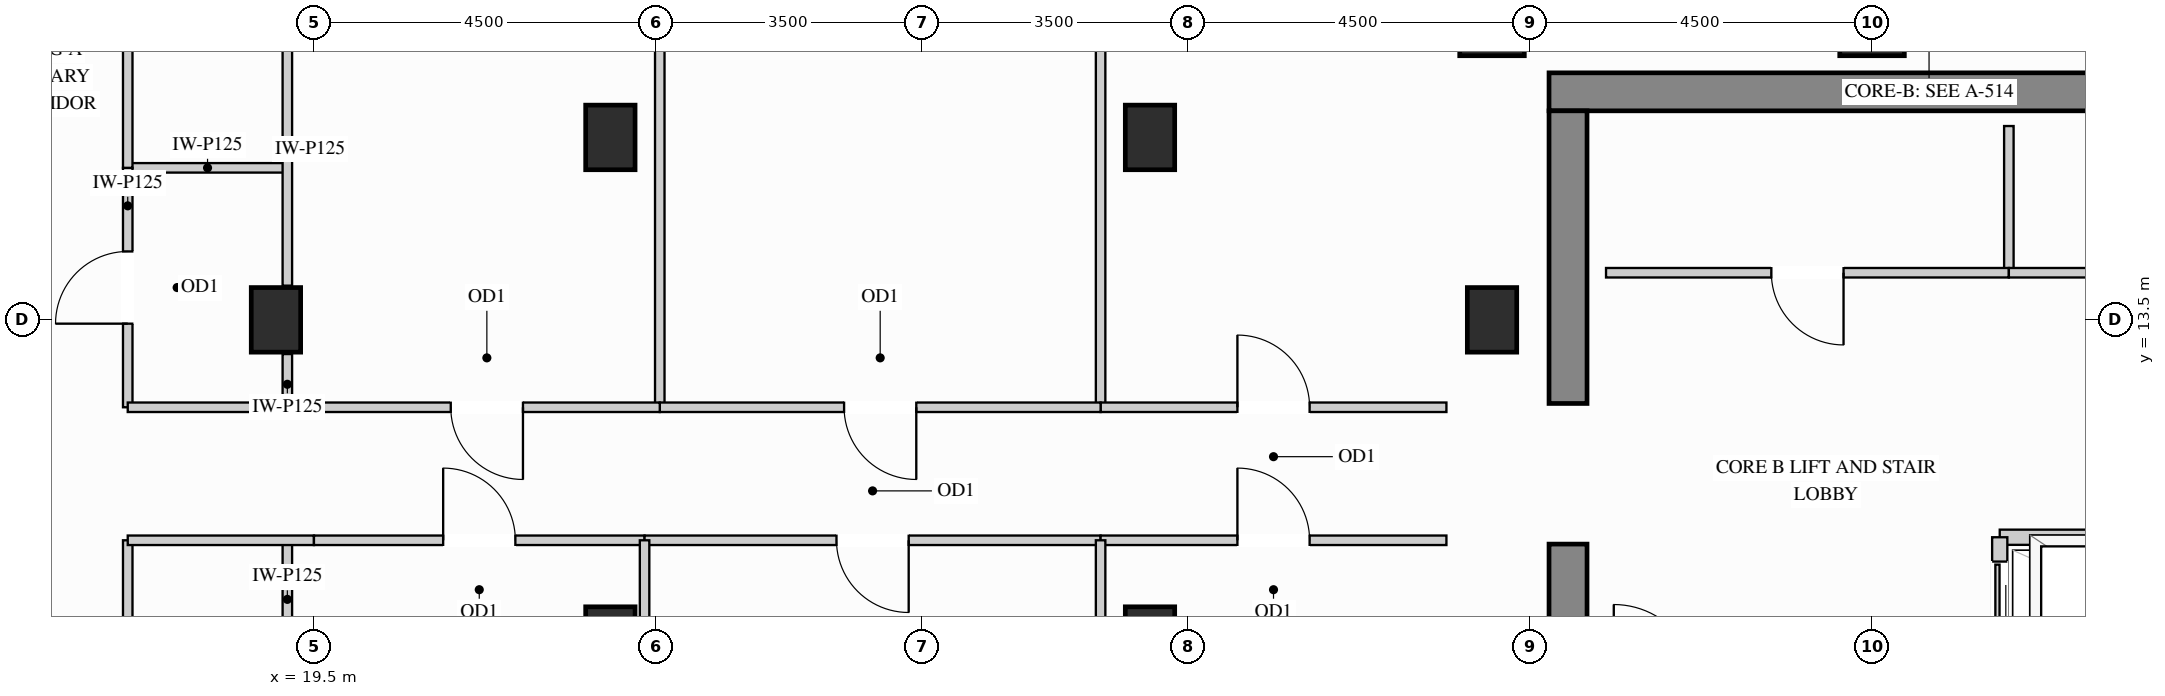
"""IFC4 building model, lengths in metres.
Left out: names, types, materials, properties, quantities, classifications, styles, units other than length and angle.
Written with IfcOpenShell. Run it as: python <this file> out.ifc"""

import sys

from ifc_helpers import new_model, si_unit, direction, frame, frame_2d, origin, origin_2d, place, context, subcontext, project, spatial, rectangle, extrude, source, transform, mapped, element, fill, save


model = new_model("IFC4")
c1 = context("Model", 3, precision=1e-05, world=origin(), true_north=direction((0.0, 1.0)))
c2 = subcontext(c1, "Body", "Model", "MODEL_VIEW")
j1 = project(units=[si_unit("LENGTHUNIT", "METRE"), si_unit("PLANEANGLEUNIT", "RADIAN")], contexts=[c1])
p1 = place(None, origin())
s1 = spatial("IfcSite", under=j1, at=p1, CompositionType="ELEMENT")
p2 = place(p1, origin())
s2 = spatial("IfcBuilding", under=s1, at=p2, CompositionType="ELEMENT")
p3 = place(p2, frame((0.0, 0.0, 252.0)))
s3 = spatial("IfcBuildingStorey", under=s2, at=p3, CompositionType="ELEMENT", Elevation=252.0)
m1 = source(origin(), c2, "Body", "SweptSolid", [
    extrude(rectangle(XDim=0.65, YDim=0.85, at=origin_2d()), origin(), (0.0, 0.0, 1.0), 3.4),
])
for number, where, z_axis, x_axis in (
    (1, (19.0, 13.5, 0.0), (0.0, 0.0, 1.0), (1.0, 0.0, 0.0)),
    (2, (35.0, 13.5, 0.0), (0.0, 0.0, 1.0), (1.0, 0.0, 0.0)),
    (3, (23.4, 15.9, 0.0), (0.0, 0.0, 1.0), (1.0, 0.0, 0.0)),
    (4, (23.4, 9.3, 0.0), (0.0, 0.0, 1.0), (1.0, 0.0, 0.0)),
    (5, (30.5, 15.9, 0.0), (0.0, 0.0, 1.0), (1.0, 0.0, 0.0)),
    (6, (30.5, 9.3, 0.0), (0.0, 0.0, 1.0), (1.0, 0.0, 0.0)),
):
    element("IfcColumn", number, at=place(p3, frame(where, z_axis=z_axis, x_axis=x_axis)), inside=s3, PredefinedType="COLUMN", context=c2, shape_type="MappedRepresentation", body=[
        mapped(m1, transform((0.0, 0.0, 0.0), x_axis=(1.0, 0.0, 0.0), y_axis=(0.0, 1.0, 0.0), z_axis=(0.0, 0.0, 1.0))),
    ])
m2 = source(origin(), c2, "Body", "SweptSolid", [
    extrude(rectangle(XDim=0.85, YDim=0.85, at=origin_2d()), origin(), (0.0, 0.0, 1.0), 3.4),
])
for number, where, z_axis, x_axis in (
    (7, (35.0, 17.4, 0.0), (0.0, 0.0, 1.0), (1.0, 0.0, 0.0)),
    (8, (40.0, 17.4, 0.0), (0.0, 0.0, 1.0), (1.0, 0.0, 0.0)),
):
    element("IfcColumn", number, at=place(p3, frame(where, z_axis=z_axis, x_axis=x_axis)), inside=s3, PredefinedType="COLUMN", context=c2, shape_type="MappedRepresentation", body=[
        mapped(m2, transform((0.0, 0.0, 0.0), x_axis=(1.0, 0.0, 0.0), y_axis=(0.0, 1.0, 0.0), z_axis=(0.0, 0.0, 1.0))),
    ])
m3 = source(origin(), c2, "Body", "SweptSolid", [
    extrude(rectangle(XDim=10.0, YDim=0.5, at=frame_2d((5.0, 0.0))), origin(), (0.0, 0.0, 1.0), 3.4),
])
p4 = place(p3, frame((35.75, 16.5, 0.0), z_axis=(0.0, 0.0, 1.0), x_axis=(1.0, 0.0, 0.0)))
e9 = element("IfcWall", 9, at=p4, inside=s3, PredefinedType="SHEAR", context=c2, shape_type="MappedRepresentation", body=[
    mapped(m3, transform((0.0, 0.0, 0.0), x_axis=(1.0, 0.0, 0.0), y_axis=(0.0, 1.0, 0.0), z_axis=(0.0, 0.0, 1.0))),
])
m4 = source(origin(), c2, "Body", "SweptSolid", [
    extrude(rectangle(XDim=5.8, YDim=0.5, at=frame_2d((2.9, 0.0))), origin(), (0.0, 0.0, 1.0), 3.4),
])
p5 = place(p3, frame((36.0, 4.75, 0.0), z_axis=(0.0, 0.0, 1.0), x_axis=(0.0, 1.0, 0.0)))
e10 = element("IfcWall", 10, at=p5, inside=s3, PredefinedType="SHEAR", context=c2, shape_type="MappedRepresentation", body=[
    mapped(m4, transform((0.0, 0.0, 0.0), x_axis=(1.0, 0.0, 0.0), y_axis=(0.0, 1.0, 0.0), z_axis=(0.0, 0.0, 1.0))),
])
m5 = source(origin(), c2, "Body", "SweptSolid", [
    extrude(rectangle(XDim=3.85, YDim=0.5, at=frame_2d((1.925, 0.0))), origin(), (0.0, 0.0, 1.0), 3.4),
])
p6 = place(p3, frame((36.0, 12.4, 0.0), z_axis=(0.0, 0.0, 1.0), x_axis=(0.0, 1.0, 0.0)))
e11 = element("IfcWall", 11, at=p6, inside=s3, PredefinedType="SHEAR", context=c2, shape_type="MappedRepresentation", body=[
    mapped(m5, transform((0.0, 0.0, 0.0), x_axis=(1.0, 0.0, 0.0), y_axis=(0.0, 1.0, 0.0), z_axis=(0.0, 0.0, 1.0))),
])
m6 = source(origin(), c2, "Body", "SweptSolid", [
    extrude(rectangle(XDim=1.93, YDim=0.125, at=frame_2d((0.965, 0.0))), origin(), (0.0, 0.0, 1.0), 3.385),
])
p7 = place(p3, frame((41.8, 14.12, 0.0), z_axis=(0.0, 0.0, 1.0), x_axis=(0.0, 1.0, 0.0)))
e12 = element("IfcWall", 12, at=p7, inside=s3, PredefinedType="PARTITIONING", context=c2, shape_type="MappedRepresentation", body=[
    mapped(m6, transform((0.0, 0.0, 0.0), x_axis=(1.0, 0.0, 0.0), y_axis=(0.0, 1.0, 0.0), z_axis=(0.0, 0.0, 1.0))),
])
p8 = place(p3, frame((36.5, 14.12, 0.0), z_axis=(0.0, 0.0, 1.0), x_axis=(1.0, 0.0, 0.0)))
e13 = element("IfcWall", 13, at=p8, inside=s3, PredefinedType="PARTITIONING", context=c2, shape_type="SweptSolid", body=[
    extrude(rectangle(XDim=5.3, YDim=0.125, at=frame_2d((2.65, 0.0))), origin(), (0.0, 0.0, 1.0), 3.385),
])
p9 = place(p8, frame((2.175, 0.0, 0.0)))
e14 = element("IfcOpeningElement", 14, at=p9, cuts=e13, PredefinedType="OPENING", context=c2, shape_type="SweptSolid", body=[
    extrude(rectangle(XDim=0.95, YDim=2.15, at=frame_2d((0.475, 1.075))), frame((0.0, 0.073, 0.0), z_axis=(0.0, -1.0, 0.0), x_axis=(1.0, 0.0, 0.0)), (0.0, 0.0, 1.0), 0.145),
])
p10 = place(p3, frame((41.8, 14.12, 0.0), z_axis=(0.0, 0.0, 1.0), x_axis=(1.0, 0.0, 0.0)))
e15 = element("IfcWall", 15, at=p10, inside=s3, PredefinedType="PARTITIONING", context=c2, shape_type="SweptSolid", body=[
    extrude(rectangle(XDim=3.22, YDim=0.125, at=frame_2d((1.61, 0.0))), origin(), (0.0, 0.0, 1.0), 3.385),
])
p11 = place(p10, frame((1.135, 0.0, 0.0)))
e16 = element("IfcOpeningElement", 16, at=p11, cuts=e15, PredefinedType="OPENING", context=c2, shape_type="SweptSolid", body=[
    extrude(rectangle(XDim=0.85, YDim=2.1, at=frame_2d((0.425, 1.05))), frame((0.0, 0.073, 0.0), z_axis=(0.0, -1.0, 0.0), x_axis=(1.0, 0.0, 0.0)), (0.0, 0.0, 1.0), 0.145),
])
m7 = source(origin(), c2, "Body", "SweptSolid", [
    extrude(rectangle(XDim=2.1, YDim=0.125, at=frame_2d((1.05, 0.0))), origin(), (0.0, 0.0, 1.0), 3.385),
])
p12 = place(p3, frame((17.05, 15.5, 0.0), z_axis=(0.0, 0.0, 1.0), x_axis=(1.0, 0.0, 0.0)))
e17 = element("IfcWall", 17, at=p12, inside=s3, PredefinedType="PARTITIONING", context=c2, shape_type="MappedRepresentation", body=[
    mapped(m7, transform((0.0, 0.0, 0.0), x_axis=(1.0, 0.0, 0.0), y_axis=(0.0, 1.0, 0.0), z_axis=(0.0, 0.0, 1.0))),
])
m8 = source(origin(), c2, "Body", "SweptSolid", [
    extrude(rectangle(XDim=0.7, YDim=0.125, at=frame_2d((0.35, 0.0))), origin(), (0.0, 0.0, 1.0), 2.773),
])
p13 = place(p3, frame((19.15, 12.35, 0.0), z_axis=(0.0, 0.0, 1.0), x_axis=(0.0, 1.0, 0.0)))
e18 = element("IfcWall", 18, at=p13, inside=s3, PredefinedType="PARTITIONING", context=c2, shape_type="MappedRepresentation", body=[
    mapped(m8, transform((0.0, 0.0, 0.0), x_axis=(1.0, 0.0, 0.0), y_axis=(0.0, 1.0, 0.0), z_axis=(0.0, 0.0, 1.0))),
])
m9 = source(origin(), c2, "Body", "SweptSolid", [
    extrude(rectangle(XDim=3.6, YDim=0.125, at=frame_2d((1.8, 0.0))), origin(), (0.0, 0.0, 1.0), 2.773),
])
p14 = place(p3, frame((19.15, 13.95, 0.0), z_axis=(0.0, 0.0, 1.0), x_axis=(0.0, 1.0, 0.0)))
e19 = element("IfcWall", 19, at=p14, inside=s3, PredefinedType="PARTITIONING", context=c2, shape_type="MappedRepresentation", body=[
    mapped(m9, transform((0.0, 0.0, 0.0), x_axis=(1.0, 0.0, 0.0), y_axis=(0.0, 1.0, 0.0), z_axis=(0.0, 0.0, 1.0))),
])
m10 = source(origin(), c2, "Body", "SweptSolid", [
    extrude(rectangle(XDim=1.65, YDim=0.125, at=frame_2d((0.825, 0.0))), origin(), (0.0, 0.0, 1.0), 2.773),
])
p15 = place(p3, frame((19.15, 8.95, 0.0), z_axis=(0.0, 0.0, 1.0), x_axis=(0.0, 1.0, 0.0)))
e20 = element("IfcWall", 20, at=p15, inside=s3, PredefinedType="PARTITIONING", context=c2, shape_type="MappedRepresentation", body=[
    mapped(m10, transform((0.0, 0.0, 0.0), x_axis=(1.0, 0.0, 0.0), y_axis=(0.0, 1.0, 0.0), z_axis=(0.0, 0.0, 1.0))),
])
p16 = place(p3, frame((17.05, 12.35, 0.0), z_axis=(0.0, 0.0, 1.0), x_axis=(0.0, 1.0, 0.0)))
e21 = element("IfcWall", 21, at=p16, inside=s3, PredefinedType="PARTITIONING", context=c2, shape_type="SweptSolid", body=[
    extrude(rectangle(XDim=3.15, YDim=0.125, at=frame_2d((1.575, 0.0))), origin(), (0.0, 0.0, 1.0), 3.385),
])
p17 = place(p16, frame((1.1, 0.0, 0.0)))
e22 = element("IfcOpeningElement", 22, at=p17, cuts=e21, PredefinedType="OPENING", context=c2, shape_type="SweptSolid", body=[
    extrude(rectangle(XDim=0.95, YDim=2.15, at=frame_2d((0.475, 1.075))), frame((0.0, 0.073, 0.0), z_axis=(0.0, -1.0, 0.0), x_axis=(1.0, 0.0, 0.0)), (0.0, 0.0, 1.0), 0.145),
])
p18 = place(p3, frame((17.05, 15.5, 0.0), z_axis=(0.0, 0.0, 1.0), x_axis=(0.0, 1.0, 0.0)))
e23 = element("IfcWall", 23, at=p18, inside=s3, PredefinedType="PARTITIONING", context=c2, shape_type="SweptSolid", body=[
    extrude(rectangle(XDim=7.85, YDim=0.125, at=frame_2d((3.925, 0.0))), origin(), (0.0, 0.0, 1.0), 3.385),
])
p19 = place(p18, frame((3.45, 0.0, 0.0)))
e24 = element("IfcOpeningElement", 24, at=p19, cuts=e23, PredefinedType="OPENING", context=c2, shape_type="SweptSolid", body=[
    extrude(rectangle(XDim=0.95, YDim=2.15, at=frame_2d((0.475, 1.075))), frame((0.0, 0.073, 0.0), z_axis=(0.0, -1.0, 0.0), x_axis=(1.0, 0.0, 0.0)), (0.0, 0.0, 1.0), 0.145),
])
p20 = place(p3, frame((17.05, 4.65, 0.0), z_axis=(0.0, 0.0, 1.0), x_axis=(0.0, 1.0, 0.0)))
e25 = element("IfcWall", 25, at=p20, inside=s3, PredefinedType="PARTITIONING", context=c2, shape_type="SweptSolid", body=[
    extrude(rectangle(XDim=5.95, YDim=0.125, at=frame_2d((2.975, 0.0))), origin(), (0.0, 0.0, 1.0), 3.385),
])
p21 = place(p20, frame((2.5, 0.0, 0.0)))
e26 = element("IfcOpeningElement", 26, at=p21, cuts=e25, PredefinedType="OPENING", context=c2, shape_type="SweptSolid", body=[
    extrude(rectangle(XDim=0.95, YDim=2.15, at=frame_2d((0.475, 1.075))), frame((0.0, 0.073, 0.0), z_axis=(0.0, -1.0, 0.0), x_axis=(1.0, 0.0, 0.0)), (0.0, 0.0, 1.0), 0.145),
])
m11 = source(origin(), c2, "Body", "SweptSolid", [
    extrude(rectangle(XDim=9.798, YDim=0.125, at=frame_2d((4.899, 0.0))), origin(), (0.0, 0.0, 1.0), 3.385),
])
for number, where, z_axis, x_axis in (
    (27, (24.05, 12.35, 0.0), (0.0, 0.0, 1.0), (0.0, 1.0, 0.0)),
    (28, (29.85, 12.35, 0.0), (0.0, 0.0, 1.0), (0.0, 1.0, 0.0)),
):
    element("IfcWall", number, at=place(p3, frame(where, z_axis=z_axis, x_axis=x_axis)), inside=s3, PredefinedType="PARTITIONING", context=c2, shape_type="MappedRepresentation", body=[
        mapped(m11, transform((0.0, 0.0, 0.0), x_axis=(1.0, 0.0, 0.0), y_axis=(0.0, 1.0, 0.0), z_axis=(0.0, 0.0, 1.0))),
    ])
p22 = place(p3, frame((29.85, 12.35, 0.0), z_axis=(0.0, 0.0, 1.0), x_axis=(1.0, 0.0, 0.0)))
e29 = element("IfcWall", 29, at=p22, inside=s3, PredefinedType="PARTITIONING", context=c2, shape_type="SweptSolid", body=[
    extrude(rectangle(XDim=4.55, YDim=0.125, at=frame_2d((2.275, 0.0))), origin(), (0.0, 0.0, 1.0), 3.385),
])
p23 = place(p22, frame((1.8, 0.0, 0.0)))
e30 = element("IfcOpeningElement", 30, at=p23, cuts=e29, PredefinedType="OPENING", context=c2, shape_type="SweptSolid", body=[
    extrude(rectangle(XDim=0.95, YDim=2.15, at=frame_2d((0.475, 1.075))), frame((0.0, 0.073, 0.0), z_axis=(0.0, -1.0, 0.0), x_axis=(1.0, 0.0, 0.0)), (0.0, 0.0, 1.0), 0.145),
])
p24 = place(p3, frame((24.05, 12.35, 0.0), z_axis=(0.0, 0.0, 1.0), x_axis=(1.0, 0.0, 0.0)))
e31 = element("IfcWall", 31, at=p24, inside=s3, PredefinedType="PARTITIONING", context=c2, shape_type="SweptSolid", body=[
    extrude(rectangle(XDim=5.8, YDim=0.125, at=frame_2d((2.9, 0.0))), origin(), (0.0, 0.0, 1.0), 3.385),
])
p25 = place(p24, frame((2.425, 0.0, 0.0)))
e32 = element("IfcOpeningElement", 32, at=p25, cuts=e31, PredefinedType="OPENING", context=c2, shape_type="SweptSolid", body=[
    extrude(rectangle(XDim=0.95, YDim=2.15, at=frame_2d((0.475, 1.075))), frame((0.0, 0.073, 0.0), z_axis=(0.0, -1.0, 0.0), x_axis=(1.0, 0.0, 0.0)), (0.0, 0.0, 1.0), 0.145),
])
m12 = source(origin(), c2, "Body", "SweptSolid", [
    extrude(rectangle(XDim=2.45, YDim=0.125, at=frame_2d((1.225, 0.0))), origin(), (0.0, 0.0, 1.0), 3.385),
])
p26 = place(p3, frame((17.05, 12.35, 0.0), z_axis=(0.0, 0.0, 1.0), x_axis=(1.0, 0.0, 0.0)))
e33 = element("IfcWall", 33, at=p26, inside=s3, PredefinedType="PARTITIONING", context=c2, shape_type="MappedRepresentation", body=[
    mapped(m12, transform((0.0, 0.0, 0.0), x_axis=(1.0, 0.0, 0.0), y_axis=(0.0, 1.0, 0.0), z_axis=(0.0, 0.0, 1.0))),
])
p27 = place(p3, frame((19.5, 12.35, 0.0), z_axis=(0.0, 0.0, 1.0), x_axis=(1.0, 0.0, 0.0)))
e34 = element("IfcWall", 34, at=p27, inside=s3, PredefinedType="PARTITIONING", context=c2, shape_type="SweptSolid", body=[
    extrude(rectangle(XDim=4.55, YDim=0.125, at=frame_2d((2.275, 0.0))), origin(), (0.0, 0.0, 1.0), 3.385),
])
p28 = place(p27, frame((1.8, 0.0, 0.0)))
e35 = element("IfcOpeningElement", 35, at=p28, cuts=e34, PredefinedType="OPENING", context=c2, shape_type="SweptSolid", body=[
    extrude(rectangle(XDim=0.95, YDim=2.15, at=frame_2d((0.475, 1.075))), frame((0.0, 0.073, 0.0), z_axis=(0.0, -1.0, 0.0), x_axis=(1.0, 0.0, 0.0)), (0.0, 0.0, 1.0), 0.145),
])
p29 = place(p3, frame((17.05, 10.6, 0.0), z_axis=(0.0, 0.0, 1.0), x_axis=(1.0, 0.0, 0.0)))
e36 = element("IfcWall", 36, at=p29, inside=s3, PredefinedType="PARTITIONING", context=c2, shape_type="MappedRepresentation", body=[
    mapped(m12, transform((0.0, 0.0, 0.0), x_axis=(1.0, 0.0, 0.0), y_axis=(0.0, 1.0, 0.0), z_axis=(0.0, 0.0, 1.0))),
])
p30 = place(p3, frame((19.5, 10.6, 0.0), z_axis=(0.0, 0.0, 1.0), x_axis=(1.0, 0.0, 0.0)))
e37 = element("IfcWall", 37, at=p30, inside=s3, PredefinedType="PARTITIONING", context=c2, shape_type="SweptSolid", body=[
    extrude(rectangle(XDim=4.35, YDim=0.125, at=frame_2d((2.175, 0.0))), origin(), (0.0, 0.0, 1.0), 3.385),
])
p31 = place(p30, frame((1.7, 0.0, 0.0)))
e38 = element("IfcOpeningElement", 38, at=p31, cuts=e37, PredefinedType="OPENING", context=c2, shape_type="SweptSolid", body=[
    extrude(rectangle(XDim=0.95, YDim=2.15, at=frame_2d((0.475, 1.075))), frame((0.0, 0.073, 0.0), z_axis=(0.0, -1.0, 0.0), x_axis=(1.0, 0.0, 0.0)), (0.0, 0.0, 1.0), 0.145),
])
p32 = place(p3, frame((23.85, 10.6, 0.0), z_axis=(0.0, 0.0, 1.0), x_axis=(1.0, 0.0, 0.0)))
e39 = element("IfcWall", 39, at=p32, inside=s3, PredefinedType="PARTITIONING", context=c2, shape_type="SweptSolid", body=[
    extrude(rectangle(XDim=6.0, YDim=0.125, at=frame_2d((3.0, 0.0))), origin(), (0.0, 0.0, 1.0), 3.385),
])
p33 = place(p32, frame((2.525, 0.0, 0.0)))
e40 = element("IfcOpeningElement", 40, at=p33, cuts=e39, PredefinedType="OPENING", context=c2, shape_type="SweptSolid", body=[
    extrude(rectangle(XDim=0.95, YDim=2.15, at=frame_2d((0.475, 1.075))), frame((0.0, 0.073, 0.0), z_axis=(0.0, -1.0, 0.0), x_axis=(1.0, 0.0, 0.0)), (0.0, 0.0, 1.0), 0.145),
])
p34 = place(p3, frame((29.85, 10.6, 0.0), z_axis=(0.0, 0.0, 1.0), x_axis=(1.0, 0.0, 0.0)))
e41 = element("IfcWall", 41, at=p34, inside=s3, PredefinedType="PARTITIONING", context=c2, shape_type="SweptSolid", body=[
    extrude(rectangle(XDim=4.55, YDim=0.125, at=frame_2d((2.275, 0.0))), origin(), (0.0, 0.0, 1.0), 3.385),
])
p35 = place(p34, frame((1.8, 0.0, 0.0)))
e42 = element("IfcOpeningElement", 42, at=p35, cuts=e41, PredefinedType="OPENING", context=c2, shape_type="SweptSolid", body=[
    extrude(rectangle(XDim=0.95, YDim=2.15, at=frame_2d((0.475, 1.075))), frame((0.0, 0.073, 0.0), z_axis=(0.0, -1.0, 0.0), x_axis=(1.0, 0.0, 0.0)), (0.0, 0.0, 1.0), 0.145),
])
m13 = source(origin(), c2, "Body", "SweptSolid", [
    extrude(rectangle(XDim=10.248, YDim=0.125, at=frame_2d((5.124, 0.0))), origin(), (0.0, 0.0, 1.0), 3.385),
])
for number, where, z_axis, x_axis in (
    (43, (23.85, 0.352, 0.0), (0.0, 0.0, 1.0), (0.0, 1.0, 0.0)),
    (44, (29.85, 0.352, 0.0), (0.0, 0.0, 1.0), (0.0, 1.0, 0.0)),
):
    element("IfcWall", number, at=place(p3, frame(where, z_axis=z_axis, x_axis=x_axis)), inside=s3, PredefinedType="PARTITIONING", context=c2, shape_type="MappedRepresentation", body=[
        mapped(m13, transform((0.0, 0.0, 0.0), x_axis=(1.0, 0.0, 0.0), y_axis=(0.0, 1.0, 0.0), z_axis=(0.0, 0.0, 1.0))),
    ])
m14 = source(origin(), c2, "Body", "SweptSolid", [
    extrude(rectangle(XDim=3.49, YDim=0.2, at=frame_2d((1.745, 0.0))), origin(), (0.0, 0.0, 1.0), 3.385),
])
p36 = place(p3, frame((41.68, 10.64, 0.0), z_axis=(0.0, 0.0, 1.0), x_axis=(1.0, 0.0, 0.0)))
e45 = element("IfcWall", 45, at=p36, inside=s3, PredefinedType="PARTITIONING", context=c2, shape_type="MappedRepresentation", body=[
    mapped(m14, transform((0.0, 0.0, 0.0), x_axis=(1.0, 0.0, 0.0), y_axis=(0.0, 1.0, 0.0), z_axis=(0.0, 0.0, 1.0))),
])
p37 = place(p3, frame((41.68, 8.9, 0.0), z_axis=(0.0, 0.0, 1.0), x_axis=(0.0, 1.0, 0.0)))
e46 = element("IfcWall", 46, at=p37, inside=s3, PredefinedType="PARTITIONING", context=c2, shape_type="SweptSolid", body=[
    extrude(rectangle(XDim=1.74, YDim=0.2, at=frame_2d((0.87, 0.0))), origin(), (0.0, 0.0, 1.0), 3.385),
])
p38 = place(p37, frame((0.32, 0.0, 0.0)))
e47 = element("IfcOpeningElement", 47, at=p38, cuts=e46, PredefinedType="OPENING", context=c2, shape_type="SweptSolid", body=[
    extrude(rectangle(XDim=1.1, YDim=2.2, at=frame_2d((0.55, 1.1))), frame((0.0, 0.11, 0.0), z_axis=(0.0, -1.0, 0.0), x_axis=(1.0, 0.0, 0.0)), (0.0, 0.0, 1.0), 0.22),
])
m15 = source(origin(), c2, "Body", "SweptSolid", [
    extrude(rectangle(XDim=1.1, YDim=2.2, at=frame_2d((0.55, 1.1))), frame((0.0, 0.025, 0.0), z_axis=(0.0, -1.0, 0.0), x_axis=(1.0, 0.0, 0.0)), (0.0, 0.0, 1.0), 0.05),
])
p39 = place(p38, origin())
e48 = element("IfcDoor", 48, at=p39, inside=s3, OperationType="SLIDING_TO_LEFT", PredefinedType="DOOR", context=c2, shape_type="MappedRepresentation", body=[
    mapped(m15, transform((0.0, 0.0, 0.0), x_axis=(1.0, 0.0, 0.0), y_axis=(0.0, 1.0, 0.0), z_axis=(0.0, 0.0, 1.0))),
])
fill(e47, e48)
m16 = source(origin(), c2, "Body", "SweptSolid", [
    extrude(rectangle(XDim=0.95, YDim=2.15, at=frame_2d((0.475, 1.075))), frame((0.0, 0.025, 0.0), z_axis=(0.0, -1.0, 0.0), x_axis=(1.0, 0.0, 0.0)), (0.0, 0.0, 1.0), 0.05),
])
p40 = place(p17, origin())
e49 = element("IfcDoor", 49, at=p40, inside=s3, OperationType="SINGLE_SWING_LEFT", PredefinedType="DOOR", context=c2, shape_type="MappedRepresentation", body=[
    mapped(m16, transform((0.0, 0.0, 0.0), x_axis=(1.0, 0.0, 0.0), y_axis=(0.0, 1.0, 0.0), z_axis=(0.0, 0.0, 1.0))),
])
fill(e22, e49)
p41 = place(p9, origin())
e50 = element("IfcDoor", 50, at=p41, inside=s3, OperationType="SINGLE_SWING_RIGHT", PredefinedType="DOOR", context=c2, shape_type="MappedRepresentation", body=[
    mapped(m16, transform((0.0, 0.0, 0.0), x_axis=(1.0, 0.0, 0.0), y_axis=(0.0, 1.0, 0.0), z_axis=(0.0, 0.0, 1.0))),
])
fill(e14, e50)
p42 = place(p25, origin())
e51 = element("IfcDoor", 51, at=p42, inside=s3, OperationType="SINGLE_SWING_RIGHT", PredefinedType="DOOR", context=c2, shape_type="MappedRepresentation", body=[
    mapped(m16, transform((0.0, 0.0, 0.0), x_axis=(1.0, 0.0, 0.0), y_axis=(0.0, 1.0, 0.0), z_axis=(0.0, 0.0, 1.0))),
])
fill(e32, e51)
p43 = place(p28, origin())
e52 = element("IfcDoor", 52, at=p43, inside=s3, OperationType="SINGLE_SWING_RIGHT", PredefinedType="DOOR", context=c2, shape_type="MappedRepresentation", body=[
    mapped(m16, transform((0.0, 0.0, 0.0), x_axis=(1.0, 0.0, 0.0), y_axis=(0.0, 1.0, 0.0), z_axis=(0.0, 0.0, 1.0))),
])
fill(e35, e52)
p44 = place(p23, origin())
e53 = element("IfcDoor", 53, at=p44, inside=s3, OperationType="SINGLE_SWING_LEFT", PredefinedType="DOOR", context=c2, shape_type="MappedRepresentation", body=[
    mapped(m16, transform((0.0, 0.0, 0.0), x_axis=(1.0, 0.0, 0.0), y_axis=(0.0, 1.0, 0.0), z_axis=(0.0, 0.0, 1.0))),
])
fill(e30, e53)
p45 = place(p31, origin())
e54 = element("IfcDoor", 54, at=p45, inside=s3, OperationType="SINGLE_SWING_LEFT", PredefinedType="DOOR", context=c2, shape_type="MappedRepresentation", body=[
    mapped(m16, transform((0.0, 0.0, 0.0), x_axis=(1.0, 0.0, 0.0), y_axis=(0.0, 1.0, 0.0), z_axis=(0.0, 0.0, 1.0))),
])
fill(e38, e54)
p46 = place(p33, origin())
e55 = element("IfcDoor", 55, at=p46, inside=s3, OperationType="SINGLE_SWING_RIGHT", PredefinedType="DOOR", context=c2, shape_type="MappedRepresentation", body=[
    mapped(m16, transform((0.0, 0.0, 0.0), x_axis=(1.0, 0.0, 0.0), y_axis=(0.0, 1.0, 0.0), z_axis=(0.0, 0.0, 1.0))),
])
fill(e40, e55)
p47 = place(p35, origin())
e56 = element("IfcDoor", 56, at=p47, inside=s3, OperationType="SINGLE_SWING_LEFT", PredefinedType="DOOR", context=c2, shape_type="MappedRepresentation", body=[
    mapped(m16, transform((0.0, 0.0, 0.0), x_axis=(1.0, 0.0, 0.0), y_axis=(0.0, 1.0, 0.0), z_axis=(0.0, 0.0, 1.0))),
])
fill(e42, e56)
save(model, sys.argv[1])
